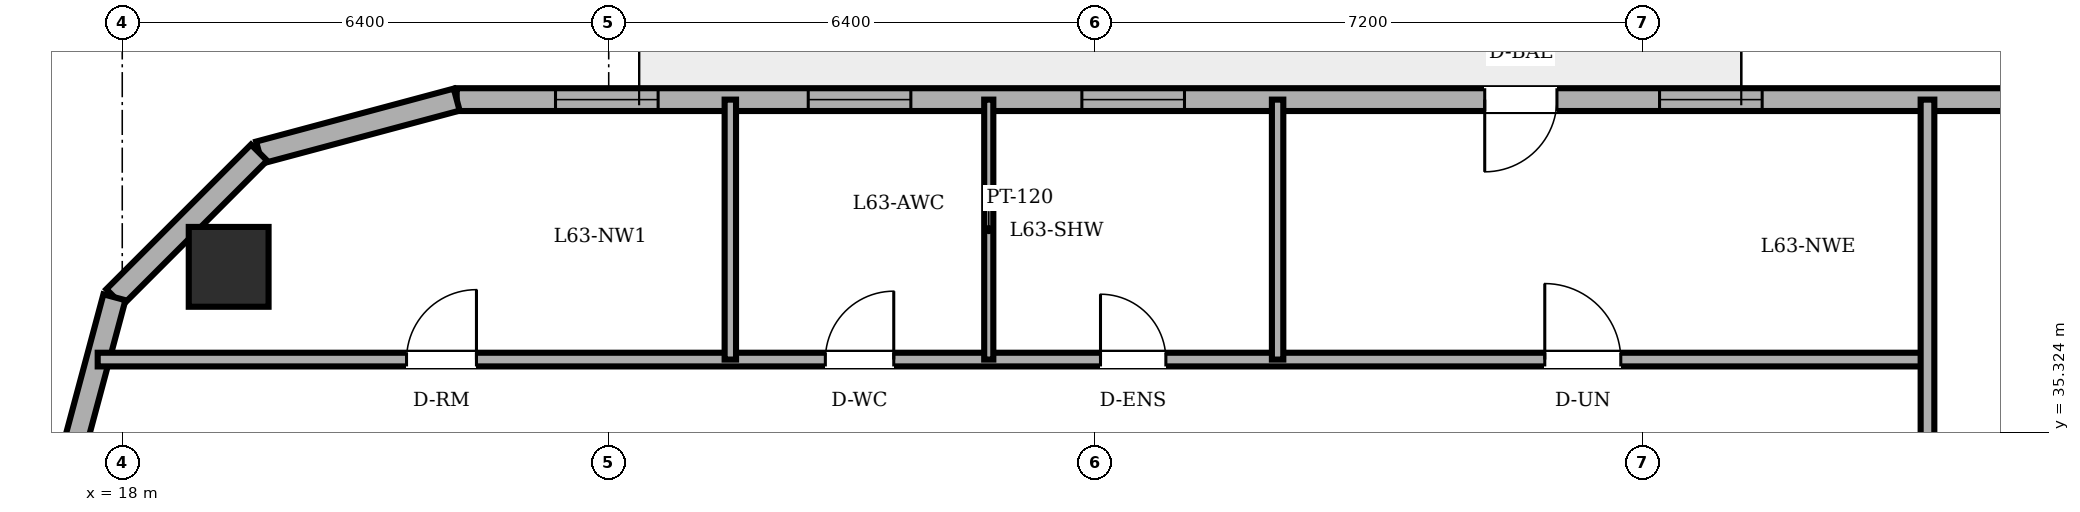
"""IFC4 building model, lengths in metres.
Left out: names, types, materials, properties, quantities, classifications, styles, units other than length and angle.
Written with IfcOpenShell. Run it as: python <this file> out.ifc"""

import sys

from ifc_helpers import new_model, si_unit, direction, frame, frame_2d, origin, origin_2d, place, context, subcontext, project, spatial, rectangle, circle, extrude, element, fill, save


model = new_model("IFC4")
c1 = context("Model", 3, precision=1e-05, world=origin(), true_north=direction((0.0, 1.0)))
c2 = subcontext(c1, "Body", "Model", "MODEL_VIEW")
j1 = project(units=[si_unit("LENGTHUNIT", "METRE"), si_unit("PLANEANGLEUNIT", "RADIAN")], contexts=[c1])
p1 = place(None, origin())
s1 = spatial("IfcSite", under=j1, at=p1, CompositionType="ELEMENT")
p2 = place(p1, origin())
s2 = spatial("IfcBuilding", under=s1, at=p2, CompositionType="ELEMENT")
p3 = place(p2, frame((0.0, 0.0, 240.9)))
s3 = spatial("IfcBuildingStorey", under=s2, at=p3, CompositionType="ELEMENT", Elevation=240.9)
p4 = place(p3, frame((19.4, 37.5, 0.0), z_axis=(0.0, 0.0, 1.0), x_axis=(1.0, 0.0, 0.0)))
e1 = element("IfcColumn", 1, at=p4, inside=s3, PredefinedType="COLUMN", context=c2, shape_type="SweptSolid", body=[
    extrude(circle(Radius=0.525, at=origin_2d()), origin(), (0.0, 0.0, 1.0), 3.6),
])
p5 = place(p3, frame((54.885, 39.7, 0.0), z_axis=(0.0, 0.0, 1.0), x_axis=(-1.0, 0.0, 0.0)))
e2 = element("IfcWall", 2, at=p5, inside=s3, PredefinedType="SOLIDWALL", context=c2, shape_type="SweptSolid", body=[
    extrude(rectangle(XDim=32.485, YDim=0.3, at=frame_2d((16.243, 0.0))), origin(), (0.0, 0.0, 1.0), 3.4),
])
p6 = place(p5, frame((18.01, 0.0, 0.0)))
e3 = element("IfcOpeningElement", 3, at=p6, cuts=e2, PredefinedType="OPENING", context=c2, shape_type="SweptSolid", body=[
    extrude(rectangle(XDim=0.95, YDim=2.2, at=frame_2d((0.475, 1.1))), frame((0.0, 0.16, 0.0), z_axis=(0.0, -1.0, 0.0), x_axis=(1.0, 0.0, 0.0)), (0.0, 0.0, 1.0), 0.32),
])
p7 = place(p5, frame((3.937, 0.0, 0.85)))
e4 = element("IfcOpeningElement", 4, at=p7, cuts=e2, PredefinedType="OPENING", context=c2, shape_type="SweptSolid", body=[
    extrude(rectangle(XDim=1.35, YDim=1.55, at=frame_2d((0.675, 0.775))), frame((0.0, 0.16, 0.0), z_axis=(0.0, -1.0, 0.0), x_axis=(1.0, 0.0, 0.0)), (0.0, 0.0, 1.0), 0.32),
])
p8 = place(p5, frame((8.198, 0.0, 0.85)))
e5 = element("IfcOpeningElement", 5, at=p8, cuts=e2, PredefinedType="OPENING", context=c2, shape_type="SweptSolid", body=[
    extrude(rectangle(XDim=1.35, YDim=1.55, at=frame_2d((0.675, 0.775))), frame((0.0, 0.16, 0.0), z_axis=(0.0, -1.0, 0.0), x_axis=(1.0, 0.0, 0.0)), (0.0, 0.0, 1.0), 0.32),
])
p9 = place(p5, frame((15.31, 0.0, 0.85)))
e6 = element("IfcOpeningElement", 6, at=p9, cuts=e2, PredefinedType="OPENING", context=c2, shape_type="SweptSolid", body=[
    extrude(rectangle(XDim=1.35, YDim=1.55, at=frame_2d((0.675, 0.775))), frame((0.0, 0.16, 0.0), z_axis=(0.0, -1.0, 0.0), x_axis=(1.0, 0.0, 0.0)), (0.0, 0.0, 1.0), 0.32),
])
p10 = place(p5, frame((22.91, 0.0, 0.85)))
e7 = element("IfcOpeningElement", 7, at=p10, cuts=e2, PredefinedType="OPENING", context=c2, shape_type="SweptSolid", body=[
    extrude(rectangle(XDim=1.35, YDim=1.55, at=frame_2d((0.675, 0.775))), frame((0.0, 0.16, 0.0), z_axis=(0.0, -1.0, 0.0), x_axis=(1.0, 0.0, 0.0)), (0.0, 0.0, 1.0), 0.32),
])
p11 = place(p5, frame((26.51, 0.0, 0.85)))
e8 = element("IfcOpeningElement", 8, at=p11, cuts=e2, PredefinedType="OPENING", context=c2, shape_type="SweptSolid", body=[
    extrude(rectangle(XDim=1.35, YDim=1.55, at=frame_2d((0.675, 0.775))), frame((0.0, 0.16, 0.0), z_axis=(0.0, -1.0, 0.0), x_axis=(1.0, 0.0, 0.0)), (0.0, 0.0, 1.0), 0.32),
])
p12 = place(p5, frame((29.835, 0.0, 0.85)))
e9 = element("IfcOpeningElement", 9, at=p12, cuts=e2, PredefinedType="OPENING", context=c2, shape_type="SweptSolid", body=[
    extrude(rectangle(XDim=1.35, YDim=1.55, at=frame_2d((0.675, 0.775))), frame((0.0, 0.16, 0.0), z_axis=(0.0, -1.0, 0.0), x_axis=(1.0, 0.0, 0.0)), (0.0, 0.0, 1.0), 0.32),
])
p13 = place(p3, frame((22.4, 39.7, 0.0), z_axis=(0.0, 0.0, 1.0), x_axis=(-0.965889330541, -0.258955210695, 0.0)))
e10 = element("IfcWall", 10, at=p13, inside=s3, PredefinedType="SOLIDWALL", context=c2, shape_type="SweptSolid", body=[
    extrude(rectangle(XDim=2.692, YDim=0.3, at=frame_2d((1.346, 0.0))), origin(), (0.0, 0.0, 1.0), 3.4),
])
p14 = place(p3, frame((19.8, 39.003, 0.0), z_axis=(0.0, 0.0, 1.0), x_axis=(-0.707152139074, -0.70706142039, 0.0)))
e11 = element("IfcWall", 11, at=p14, inside=s3, PredefinedType="SOLIDWALL", context=c2, shape_type="SweptSolid", body=[
    extrude(rectangle(XDim=2.691, YDim=0.3, at=frame_2d((1.346, 0.0))), origin(), (0.0, 0.0, 1.0), 3.4),
])
p15 = place(p3, frame((17.897, 37.1, 0.0), z_axis=(0.0, 0.0, 1.0), x_axis=(-0.258932525951, -0.965895412042, 0.0)))
e12 = element("IfcWall", 12, at=p15, inside=s3, PredefinedType="SOLIDWALL", context=c2, shape_type="SweptSolid", body=[
    extrude(rectangle(XDim=2.692, YDim=0.3, at=frame_2d((1.346, 0.0))), origin(), (0.0, 0.0, 1.0), 3.4),
])
p16 = place(p3, frame((17.677, 36.28, 0.0), z_axis=(0.0, 0.0, 1.0), x_axis=(1.0, 0.0, 0.0)))
e13 = element("IfcWall", 13, at=p16, inside=s3, PredefinedType="PARTITIONING", context=c2, shape_type="SweptSolid", body=[
    extrude(rectangle(XDim=24.073, YDim=0.18, at=frame_2d((12.037, 0.0))), origin(), (0.0, 0.0, 1.0), 3.4),
])
p17 = place(p16, frame((9.573, 0.0, 0.0)))
e14 = element("IfcOpeningElement", 14, at=p17, cuts=e13, PredefinedType="OPENING", context=c2, shape_type="SweptSolid", body=[
    extrude(rectangle(XDim=0.9, YDim=2.1, at=frame_2d((0.45, 1.05))), frame((0.0, 0.1, 0.0), z_axis=(0.0, -1.0, 0.0), x_axis=(1.0, 0.0, 0.0)), (0.0, 0.0, 1.0), 0.2),
])
p18 = place(p16, frame((13.193, 0.0, 0.0)))
e15 = element("IfcOpeningElement", 15, at=p18, cuts=e13, PredefinedType="OPENING", context=c2, shape_type="SweptSolid", body=[
    extrude(rectangle(XDim=0.86, YDim=2.1, at=frame_2d((0.43, 1.05))), frame((0.0, 0.1, 0.0), z_axis=(0.0, -1.0, 0.0), x_axis=(1.0, 0.0, 0.0)), (0.0, 0.0, 1.0), 0.2),
])
p19 = place(p16, frame((4.063, 0.0, 0.0)))
e16 = element("IfcOpeningElement", 16, at=p19, cuts=e13, PredefinedType="OPENING", context=c2, shape_type="SweptSolid", body=[
    extrude(rectangle(XDim=0.92, YDim=2.1, at=frame_2d((0.46, 1.05))), frame((0.0, 0.1, 0.0), z_axis=(0.0, -1.0, 0.0), x_axis=(1.0, 0.0, 0.0)), (0.0, 0.0, 1.0), 0.2),
])
p20 = place(p16, frame((19.038, 0.0, 0.0)))
e17 = element("IfcOpeningElement", 17, at=p20, cuts=e13, PredefinedType="OPENING", context=c2, shape_type="SweptSolid", body=[
    extrude(rectangle(XDim=1.0, YDim=2.15, at=frame_2d((0.5, 1.075))), frame((0.0, 0.1, 0.0), z_axis=(0.0, -1.0, 0.0), x_axis=(1.0, 0.0, 0.0)), (0.0, 0.0, 1.0), 0.2),
])
p21 = place(p3, frame((26.0, 36.28, 0.0), z_axis=(0.0, 0.0, 1.0), x_axis=(0.0, 1.0, 0.0)))
e18 = element("IfcWall", 18, at=p21, inside=s3, PredefinedType="PARTITIONING", context=c2, shape_type="SweptSolid", body=[
    extrude(rectangle(XDim=3.42, YDim=0.15, at=frame_2d((1.71, 0.0))), origin(), (0.0, 0.0, 1.0), 3.4),
])
p22 = place(p3, frame((29.4, 36.28, 0.0), z_axis=(0.0, 0.0, 1.0), x_axis=(0.0, 1.0, 0.0)))
e19 = element("IfcWall", 19, at=p22, inside=s3, PredefinedType="PARTITIONING", context=c2, shape_type="SweptSolid", body=[
    extrude(rectangle(XDim=3.42, YDim=0.12, at=frame_2d((1.71, 0.0))), origin(), (0.0, 0.0, 1.0), 3.4),
])
p23 = place(p3, frame((33.2, 36.28, 0.0), z_axis=(0.0, 0.0, 1.0), x_axis=(0.0, 1.0, 0.0)))
e20 = element("IfcWall", 20, at=p23, inside=s3, PredefinedType="PARTITIONING", context=c2, shape_type="SweptSolid", body=[
    extrude(rectangle(XDim=3.42, YDim=0.15, at=frame_2d((1.71, 0.0))), origin(), (0.0, 0.0, 1.0), 3.4),
])
p24 = place(p3, frame((41.75, 25.18, 0.0), z_axis=(0.0, 0.0, 1.0), x_axis=(0.0, 1.0, 0.0)))
e21 = element("IfcWall", 21, at=p24, inside=s3, PredefinedType="PARTITIONING", context=c2, shape_type="SweptSolid", body=[
    extrude(rectangle(XDim=14.52, YDim=0.18, at=frame_2d((7.26, 0.0))), origin(), (0.0, 0.0, 1.0), 3.4),
])
p25 = place(p6, origin())
e22 = element("IfcDoor", 22, at=p25, inside=s3, OperationType="SINGLE_SWING_RIGHT", PredefinedType="DOOR", context=c2, shape_type="SweptSolid", body=[
    extrude(rectangle(XDim=0.95, YDim=2.2, at=frame_2d((0.475, 1.1))), frame((0.0, 0.025, 0.0), z_axis=(0.0, -1.0, 0.0), x_axis=(1.0, 0.0, 0.0)), (0.0, 0.0, 1.0), 0.05),
])
fill(e3, e22)
p26 = place(p9, origin())
e23 = element("IfcWindow", 23, at=p26, inside=s3, PartitioningType="SINGLE_PANEL", PredefinedType="WINDOW", context=c2, shape_type="SweptSolid", body=[
    extrude(rectangle(XDim=1.35, YDim=1.55, at=frame_2d((0.675, 0.775))), frame((0.0, 0.03, 0.0), z_axis=(0.0, -1.0, 0.0), x_axis=(1.0, 0.0, 0.0)), (0.0, 0.0, 1.0), 0.06),
])
fill(e6, e23)
p27 = place(p10, origin())
e24 = element("IfcWindow", 24, at=p27, inside=s3, PartitioningType="SINGLE_PANEL", PredefinedType="WINDOW", context=c2, shape_type="SweptSolid", body=[
    extrude(rectangle(XDim=1.35, YDim=1.55, at=frame_2d((0.675, 0.775))), frame((0.0, 0.03, 0.0), z_axis=(0.0, -1.0, 0.0), x_axis=(1.0, 0.0, 0.0)), (0.0, 0.0, 1.0), 0.06),
])
fill(e7, e24)
p28 = place(p11, origin())
e25 = element("IfcWindow", 25, at=p28, inside=s3, PartitioningType="SINGLE_PANEL", PredefinedType="WINDOW", context=c2, shape_type="SweptSolid", body=[
    extrude(rectangle(XDim=1.35, YDim=1.55, at=frame_2d((0.675, 0.775))), frame((0.0, 0.03, 0.0), z_axis=(0.0, -1.0, 0.0), x_axis=(1.0, 0.0, 0.0)), (0.0, 0.0, 1.0), 0.06),
])
fill(e8, e25)
p29 = place(p12, origin())
e26 = element("IfcWindow", 26, at=p29, inside=s3, PartitioningType="SINGLE_PANEL", PredefinedType="WINDOW", context=c2, shape_type="SweptSolid", body=[
    extrude(rectangle(XDim=1.35, YDim=1.55, at=frame_2d((0.675, 0.775))), frame((0.0, 0.03, 0.0), z_axis=(0.0, -1.0, 0.0), x_axis=(1.0, 0.0, 0.0)), (0.0, 0.0, 1.0), 0.06),
])
fill(e9, e26)
p30 = place(p17, origin())
e27 = element("IfcDoor", 27, at=p30, inside=s3, OperationType="SINGLE_SWING_RIGHT", PredefinedType="DOOR", context=c2, shape_type="SweptSolid", body=[
    extrude(rectangle(XDim=0.9, YDim=2.1, at=frame_2d((0.45, 1.05))), frame((0.0, 0.025, 0.0), z_axis=(0.0, -1.0, 0.0), x_axis=(1.0, 0.0, 0.0)), (0.0, 0.0, 1.0), 0.05),
])
fill(e14, e27)
p31 = place(p18, origin())
e28 = element("IfcDoor", 28, at=p31, inside=s3, OperationType="SINGLE_SWING_LEFT", PredefinedType="DOOR", context=c2, shape_type="SweptSolid", body=[
    extrude(rectangle(XDim=0.86, YDim=2.1, at=frame_2d((0.43, 1.05))), frame((0.0, 0.025, 0.0), z_axis=(0.0, -1.0, 0.0), x_axis=(1.0, 0.0, 0.0)), (0.0, 0.0, 1.0), 0.05),
])
fill(e15, e28)
p32 = place(p19, origin())
e29 = element("IfcDoor", 29, at=p32, inside=s3, OperationType="SINGLE_SWING_RIGHT", PredefinedType="DOOR", context=c2, shape_type="SweptSolid", body=[
    extrude(rectangle(XDim=0.92, YDim=2.1, at=frame_2d((0.46, 1.05))), frame((0.0, 0.025, 0.0), z_axis=(0.0, -1.0, 0.0), x_axis=(1.0, 0.0, 0.0)), (0.0, 0.0, 1.0), 0.05),
])
fill(e16, e29)
p33 = place(p20, origin())
e30 = element("IfcDoor", 30, at=p33, inside=s3, OperationType="SINGLE_SWING_LEFT", PredefinedType="DOOR", context=c2, shape_type="SweptSolid", body=[
    extrude(rectangle(XDim=1.0, YDim=2.15, at=frame_2d((0.5, 1.075))), frame((0.0, 0.025, 0.0), z_axis=(0.0, -1.0, 0.0), x_axis=(1.0, 0.0, 0.0)), (0.0, 0.0, 1.0), 0.05),
])
fill(e17, e30)
save(model, sys.argv[1])
